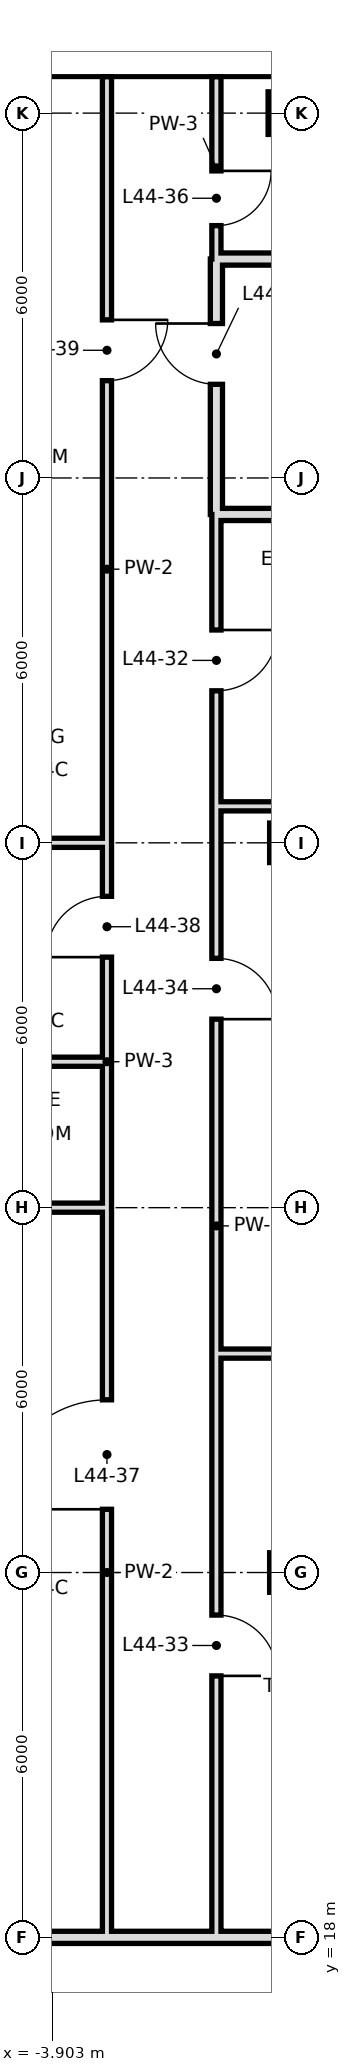
"""IFC4 building model, lengths in metres.
Left out: names, types, materials, properties, quantities, classifications, styles, units other than length and angle.
Written with IfcOpenShell. Run it as: python <this file> out.ifc"""

import sys

from ifc_helpers import new_model, si_unit, direction, frame, frame_2d, origin, origin_2d, place, context, subcontext, project, spatial, rectangle, hollow_rectangle, extrude, element, fill, save


model = new_model("IFC4")
c1 = context("Model", 3, precision=1e-05, world=origin(), true_north=direction((0.0, 1.0)))
c2 = subcontext(c1, "Body", "Model", "MODEL_VIEW")
j1 = project(units=[si_unit("LENGTHUNIT", "METRE"), si_unit("PLANEANGLEUNIT", "RADIAN")], contexts=[c1])
p1 = place(None, origin())
s1 = spatial("IfcSite", under=j1, at=p1, CompositionType="ELEMENT")
p2 = place(p1, origin())
s2 = spatial("IfcBuilding", under=s1, at=p2, CompositionType="ELEMENT")
p3 = place(p2, frame((0.0, 0.0, 192.0)))
s3 = spatial("IfcBuildingStorey", under=s2, at=p3, CompositionType="ELEMENT", Elevation=192.0)
for number, where, z_axis, x_axis in (
    (1, (0.0, 24.0, 0.0), (0.0, 0.0, 1.0), (1.0, 0.0, 0.0)),
    (2, (0.0, 36.0, 0.0), (0.0, 0.0, 1.0), (1.0, 0.0, 0.0)),
):
    element("IfcColumn", number, at=place(p3, frame(where, z_axis=z_axis, x_axis=x_axis)), inside=s3, PredefinedType="COLUMN", context=c2, shape_type="SweptSolid", body=[
        extrude(hollow_rectangle(XDim=0.65, YDim=0.65, WallThickness=0.032, at=origin_2d()), origin(), (0.0, 0.0, 1.0), 3.6),
    ])
p4 = place(p3, frame((0.0, 48.0, 0.0), z_axis=(0.0, 0.0, 1.0), x_axis=(1.0, 0.0, 0.0)))
e3 = element("IfcColumn", 3, at=p4, inside=s3, PredefinedType="COLUMN", context=c2, shape_type="SweptSolid", body=[
    extrude(hollow_rectangle(XDim=0.7, YDim=0.7, WallThickness=0.036, at=origin_2d()), origin(), (0.0, 0.0, 1.0), 3.6),
])
p5 = place(p3, frame((-1.2, 41.4, 0.0), z_axis=(0.0, 0.0, 1.0), x_axis=(0.0, 1.0, 0.0)))
e4 = element("IfcWall", 4, at=p5, inside=s3, PredefinedType="SOLIDWALL", context=c2, shape_type="SweptSolid", body=[
    extrude(rectangle(XDim=4.2, YDim=0.2, at=frame_2d((2.1, 0.0))), origin(), (0.0, 0.0, 1.0), 2.72),
])
p6 = place(p5, frame((2.14, 0.0, 0.0)))
e5 = element("IfcOpeningElement", 5, at=p6, cuts=e4, PredefinedType="OPENING", context=c2, shape_type="SweptSolid", body=[
    extrude(rectangle(XDim=1.0, YDim=2.4, at=frame_2d((0.5, 1.2))), frame((0.0, 0.11, 0.0), z_axis=(0.0, -1.0, 0.0), x_axis=(1.0, 0.0, 0.0)), (0.0, 0.0, 1.0), 0.22),
])
p7 = place(p3, frame((-1.2, 18.0, 0.0), z_axis=(0.0, 0.0, 1.0), x_axis=(0.0, 1.0, 0.0)))
e6 = element("IfcWall", 6, at=p7, inside=s3, PredefinedType="PARTITIONING", context=c2, shape_type="SweptSolid", body=[
    extrude(rectangle(XDim=23.4, YDim=0.15, at=frame_2d((11.7, 0.0))), origin(), (0.0, 0.0, 1.0), 3.42),
])
p8 = place(p7, frame((20.5, 0.0, 0.0)))
e7 = element("IfcOpeningElement", 7, at=p8, cuts=e6, PredefinedType="OPENING", context=c2, shape_type="SweptSolid", body=[
    extrude(rectangle(XDim=1.0, YDim=2.4, at=frame_2d((0.5, 1.2))), frame((0.0, 0.085, 0.0), z_axis=(0.0, -1.0, 0.0), x_axis=(1.0, 0.0, 0.0)), (0.0, 0.0, 1.0), 0.17),
])
p9 = place(p7, frame((4.3, 0.0, 0.0)))
e8 = element("IfcOpeningElement", 8, at=p9, cuts=e6, PredefinedType="OPENING", context=c2, shape_type="SweptSolid", body=[
    extrude(rectangle(XDim=1.0, YDim=2.4, at=frame_2d((0.5, 1.2))), frame((0.0, 0.085, 0.0), z_axis=(0.0, -1.0, 0.0), x_axis=(1.0, 0.0, 0.0)), (0.0, 0.0, 1.0), 0.17),
])
p10 = place(p7, frame((15.1, 0.0, 0.0)))
e9 = element("IfcOpeningElement", 9, at=p10, cuts=e6, PredefinedType="OPENING", context=c2, shape_type="SweptSolid", body=[
    extrude(rectangle(XDim=1.0, YDim=2.4, at=frame_2d((0.5, 1.2))), frame((0.0, 0.085, 0.0), z_axis=(0.0, -1.0, 0.0), x_axis=(1.0, 0.0, 0.0)), (0.0, 0.0, 1.0), 0.17),
])
p11 = place(p3, frame((-1.2, 45.6, 0.0), z_axis=(0.0, 0.0, 1.0), x_axis=(0.0, 1.0, 0.0)))
e10 = element("IfcWall", 10, at=p11, inside=s3, PredefinedType="PARTITIONING", context=c2, shape_type="SweptSolid", body=[
    extrude(rectangle(XDim=3.0, YDim=0.15, at=frame_2d((1.5, 0.0))), origin(), (0.0, 0.0, 1.0), 3.42),
])
p12 = place(p11, frame((0.55, 0.0, 0.0)))
e11 = element("IfcOpeningElement", 11, at=p12, cuts=e10, PredefinedType="OPENING", context=c2, shape_type="SweptSolid", body=[
    extrude(rectangle(XDim=0.9, YDim=2.4, at=frame_2d((0.45, 1.2))), frame((0.0, 0.085, 0.0), z_axis=(0.0, -1.0, 0.0), x_axis=(1.0, 0.0, 0.0)), (0.0, 0.0, 1.0), 0.17),
])
p13 = place(p3, frame((-3.0, 18.0, 0.0), z_axis=(0.0, 0.0, 1.0), x_axis=(0.0, 1.0, 0.0)))
e12 = element("IfcWall", 12, at=p13, inside=s3, PredefinedType="PARTITIONING", context=c2, shape_type="SweptSolid", body=[
    extrude(rectangle(XDim=12.0, YDim=0.15, at=frame_2d((6.0, 0.0))), origin(), (0.0, 0.0, 1.0), 3.42),
])
p14 = place(p13, frame((7.04, 0.0, 0.0)))
e13 = element("IfcOpeningElement", 13, at=p14, cuts=e12, PredefinedType="OPENING", context=c2, shape_type="SweptSolid", body=[
    extrude(rectangle(XDim=1.8, YDim=2.4, at=frame_2d((0.9, 1.2))), frame((0.0, 0.085, 0.0), z_axis=(0.0, -1.0, 0.0), x_axis=(1.0, 0.0, 0.0)), (0.0, 0.0, 1.0), 0.17),
])
p15 = place(p3, frame((-3.0, 32.4, 0.0), z_axis=(0.0, 0.0, 1.0), x_axis=(0.0, 1.0, 0.0)))
e14 = element("IfcWall", 14, at=p15, inside=s3, PredefinedType="PARTITIONING", context=c2, shape_type="SweptSolid", body=[
    extrude(rectangle(XDim=16.2, YDim=0.15, at=frame_2d((8.1, 0.0))), origin(), (0.0, 0.0, 1.0), 3.42),
])
p16 = place(p15, frame((1.72, 0.0, 0.0)))
e15 = element("IfcOpeningElement", 15, at=p16, cuts=e14, PredefinedType="OPENING", context=c2, shape_type="SweptSolid", body=[
    extrude(rectangle(XDim=1.0, YDim=2.4, at=frame_2d((0.5, 1.2))), frame((0.0, 0.085, 0.0), z_axis=(0.0, -1.0, 0.0), x_axis=(1.0, 0.0, 0.0)), (0.0, 0.0, 1.0), 0.17),
])
p17 = place(p15, frame((11.2, 0.0, 0.0)))
e16 = element("IfcOpeningElement", 16, at=p17, cuts=e14, PredefinedType="OPENING", context=c2, shape_type="SweptSolid", body=[
    extrude(rectangle(XDim=1.0, YDim=2.4, at=frame_2d((0.5, 1.2))), frame((0.0, 0.085, 0.0), z_axis=(0.0, -1.0, 0.0), x_axis=(1.0, 0.0, 0.0)), (0.0, 0.0, 1.0), 0.17),
])
p18 = place(p3, frame((-3.0, 30.0, 0.0), z_axis=(0.0, 0.0, 1.0), x_axis=(0.0, 1.0, 0.0)))
e17 = element("IfcWall", 17, at=p18, inside=s3, PredefinedType="PARTITIONING", context=c2, shape_type="SweptSolid", body=[
    extrude(rectangle(XDim=2.4, YDim=0.15, at=frame_2d((1.2, 0.0))), origin(), (0.0, 0.0, 1.0), 3.42),
])
p19 = place(p3, frame((-12.6, 18.0, 0.0), z_axis=(0.0, 0.0, 1.0), x_axis=(1.0, 0.0, 0.0)))
e18 = element("IfcWall", 18, at=p19, inside=s3, PredefinedType="SOLIDWALL", context=c2, shape_type="SweptSolid", body=[
    extrude(rectangle(XDim=15.0, YDim=0.2, at=frame_2d((7.5, 0.0))), origin(), (0.0, 0.0, 1.0), 2.72),
])
p20 = place(p3, frame((-1.2, 27.6, 0.0), z_axis=(0.0, 0.0, 1.0), x_axis=(1.0, 0.0, 0.0)))
e19 = element("IfcWall", 19, at=p20, inside=s3, PredefinedType="PARTITIONING", context=c2, shape_type="SweptSolid", body=[
    extrude(rectangle(XDim=4.3, YDim=0.15, at=frame_2d((2.15, 0.0))), origin(), (0.0, 0.0, 1.0), 3.42),
])
p21 = place(p3, frame((-6.0, 30.0, 0.0), z_axis=(0.0, 0.0, 1.0), x_axis=(1.0, 0.0, 0.0)))
e20 = element("IfcWall", 20, at=p21, inside=s3, PredefinedType="PARTITIONING", context=c2, shape_type="SweptSolid", body=[
    extrude(rectangle(XDim=3.0, YDim=0.15, at=frame_2d((1.5, 0.0))), origin(), (0.0, 0.0, 1.0), 2.72),
])
p22 = place(p3, frame((-6.0, 32.4, 0.0), z_axis=(0.0, 0.0, 1.0), x_axis=(1.0, 0.0, 0.0)))
e21 = element("IfcWall", 21, at=p22, inside=s3, PredefinedType="PARTITIONING", context=c2, shape_type="SweptSolid", body=[
    extrude(rectangle(XDim=3.0, YDim=0.15, at=frame_2d((1.5, 0.0))), origin(), (0.0, 0.0, 1.0), 3.42),
])
p23 = place(p3, frame((-12.0, 36.0, 0.0), z_axis=(0.0, 0.0, 1.0), x_axis=(1.0, 0.0, 0.0)))
e22 = element("IfcWall", 22, at=p23, inside=s3, PredefinedType="PARTITIONING", context=c2, shape_type="SweptSolid", body=[
    extrude(rectangle(XDim=9.0, YDim=0.15, at=frame_2d((4.5, 0.0))), origin(), (0.0, 0.0, 1.0), 2.72),
])
p24 = place(p3, frame((-1.2, 36.6, 0.0), z_axis=(0.0, 0.0, 1.0), x_axis=(1.0, 0.0, 0.0)))
e23 = element("IfcWall", 23, at=p24, inside=s3, PredefinedType="PARTITIONING", context=c2, shape_type="SweptSolid", body=[
    extrude(rectangle(XDim=4.3, YDim=0.15, at=frame_2d((2.15, 0.0))), origin(), (0.0, 0.0, 1.0), 3.42),
])
for number, where, z_axis, x_axis in (
    (24, (-1.2, 41.4, 0.0), (0.0, 0.0, 1.0), (1.0, 0.0, 0.0)),
    (25, (-1.2, 45.6, 0.0), (0.0, 0.0, 1.0), (1.0, 0.0, 0.0)),
):
    element("IfcWall", number, at=place(p3, frame(where, z_axis=z_axis, x_axis=x_axis)), inside=s3, PredefinedType="SOLIDWALL", context=c2, shape_type="SweptSolid", body=[
        extrude(rectangle(XDim=4.3, YDim=0.2, at=frame_2d((2.15, 0.0))), origin(), (0.0, 0.0, 1.0), 2.72),
    ])
p25 = place(p8, origin())
e26 = element("IfcDoor", 26, at=p25, inside=s3, OperationType="SINGLE_SWING_RIGHT", PredefinedType="DOOR", context=c2, shape_type="SweptSolid", body=[
    extrude(rectangle(XDim=1.0, YDim=2.4, at=frame_2d((0.5, 1.2))), frame((0.0, 0.025, 0.0), z_axis=(0.0, -1.0, 0.0), x_axis=(1.0, 0.0, 0.0)), (0.0, 0.0, 1.0), 0.05),
])
fill(e7, e26)
p26 = place(p9, frame((1.0, 0.0, 0.0), z_axis=(0.0, 0.0, 1.0), x_axis=(-1.0, 0.0, 0.0)))
e27 = element("IfcDoor", 27, at=p26, inside=s3, OperationType="SINGLE_SWING_RIGHT", PredefinedType="DOOR", context=c2, shape_type="SweptSolid", body=[
    extrude(rectangle(XDim=1.0, YDim=2.4, at=frame_2d((0.5, 1.2))), frame((0.0, 0.025, 0.0), z_axis=(0.0, -1.0, 0.0), x_axis=(1.0, 0.0, 0.0)), (0.0, 0.0, 1.0), 0.05),
])
fill(e8, e27)
p27 = place(p10, frame((1.0, 0.0, 0.0), z_axis=(0.0, 0.0, 1.0), x_axis=(-1.0, 0.0, 0.0)))
e28 = element("IfcDoor", 28, at=p27, inside=s3, OperationType="SINGLE_SWING_RIGHT", PredefinedType="DOOR", context=c2, shape_type="SweptSolid", body=[
    extrude(rectangle(XDim=1.0, YDim=2.4, at=frame_2d((0.5, 1.2))), frame((0.0, 0.025, 0.0), z_axis=(0.0, -1.0, 0.0), x_axis=(1.0, 0.0, 0.0)), (0.0, 0.0, 1.0), 0.05),
])
fill(e9, e28)
p28 = place(p6, frame((1.0, 0.0, 0.0), z_axis=(0.0, 0.0, 1.0), x_axis=(-1.0, 0.0, 0.0)))
e29 = element("IfcDoor", 29, at=p28, inside=s3, OperationType="SINGLE_SWING_LEFT", PredefinedType="DOOR", context=c2, shape_type="SweptSolid", body=[
    extrude(rectangle(XDim=1.0, YDim=2.4, at=frame_2d((0.5, 1.2))), frame((0.0, 0.025, 0.0), z_axis=(0.0, -1.0, 0.0), x_axis=(1.0, 0.0, 0.0)), (0.0, 0.0, 1.0), 0.05),
])
fill(e5, e29)
p29 = place(p12, origin())
e30 = element("IfcDoor", 30, at=p29, inside=s3, OperationType="SINGLE_SWING_RIGHT", PredefinedType="DOOR", context=c2, shape_type="SweptSolid", body=[
    extrude(rectangle(XDim=0.9, YDim=2.4, at=frame_2d((0.45, 1.2))), frame((0.0, 0.025, 0.0), z_axis=(0.0, -1.0, 0.0), x_axis=(1.0, 0.0, 0.0)), (0.0, 0.0, 1.0), 0.05),
])
fill(e11, e30)
p30 = place(p14, origin())
e31 = element("IfcDoor", 31, at=p30, inside=s3, OperationType="SINGLE_SWING_LEFT", PredefinedType="DOOR", context=c2, shape_type="SweptSolid", body=[
    extrude(rectangle(XDim=1.8, YDim=2.4, at=frame_2d((0.9, 1.2))), frame((0.0, 0.025, 0.0), z_axis=(0.0, -1.0, 0.0), x_axis=(1.0, 0.0, 0.0)), (0.0, 0.0, 1.0), 0.05),
])
fill(e13, e31)
p31 = place(p16, origin())
e32 = element("IfcDoor", 32, at=p31, inside=s3, OperationType="SINGLE_SWING_LEFT", PredefinedType="DOOR", context=c2, shape_type="SweptSolid", body=[
    extrude(rectangle(XDim=1.0, YDim=2.4, at=frame_2d((0.5, 1.2))), frame((0.0, 0.025, 0.0), z_axis=(0.0, -1.0, 0.0), x_axis=(1.0, 0.0, 0.0)), (0.0, 0.0, 1.0), 0.05),
])
fill(e15, e32)
p32 = place(p17, origin())
e33 = element("IfcDoor", 33, at=p32, inside=s3, OperationType="SINGLE_SWING_RIGHT", PredefinedType="DOOR", context=c2, shape_type="SweptSolid", body=[
    extrude(rectangle(XDim=1.0, YDim=2.4, at=frame_2d((0.5, 1.2))), frame((0.0, 0.025, 0.0), z_axis=(0.0, -1.0, 0.0), x_axis=(1.0, 0.0, 0.0)), (0.0, 0.0, 1.0), 0.05),
])
fill(e16, e33)
save(model, sys.argv[1])
